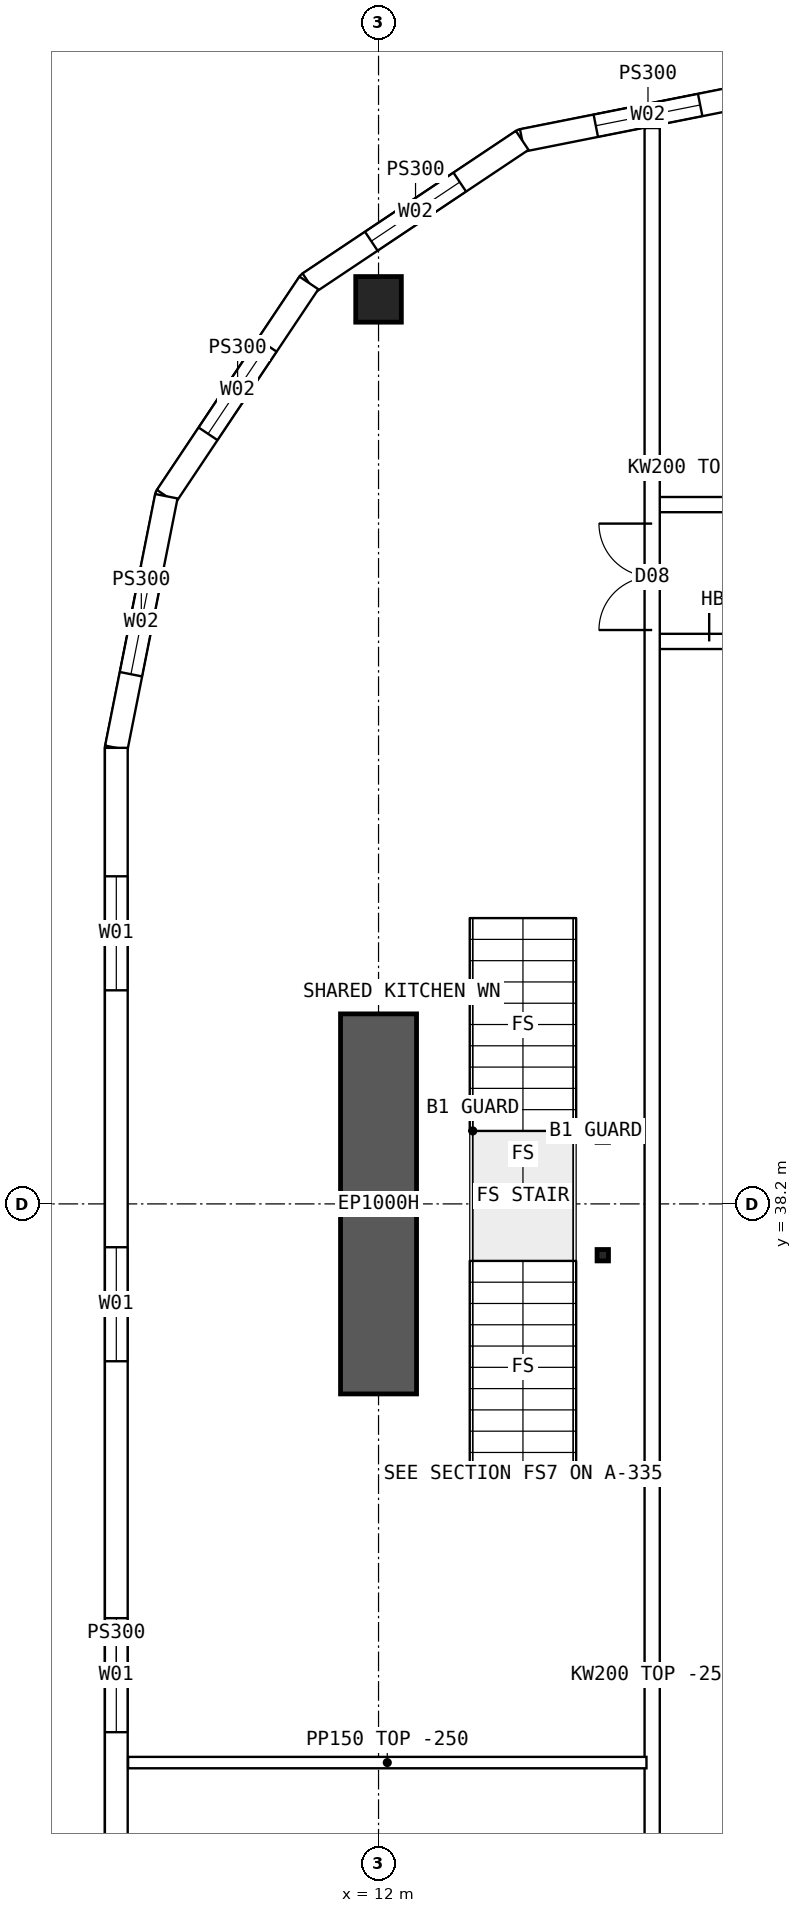
"""IFC4 building model, lengths in metres.
Left out: names, types, materials, properties, quantities, classifications, styles, units other than length and angle.
Written with IfcOpenShell. Run it as: python <this file> out.ifc"""

import sys

from ifc_helpers import new_model, si_unit, direction, frame, frame_2d, origin, origin_2d, place, context, subcontext, project, spatial, polyline, rectangle, hollow_rectangle, outline, extrude, element, fill, save


model = new_model("IFC4")
c1 = context("Model", 3, precision=1e-05, world=origin(), true_north=direction((0.0, 1.0)))
c2 = subcontext(c1, "Body", "Model", "MODEL_VIEW")
j1 = project(units=[si_unit("LENGTHUNIT", "METRE"), si_unit("PLANEANGLEUNIT", "RADIAN")], contexts=[c1])
p1 = place(None, origin())
s1 = spatial("IfcSite", under=j1, at=p1, CompositionType="ELEMENT")
p2 = place(p1, origin())
s2 = spatial("IfcBuilding", under=s1, at=p2, CompositionType="ELEMENT")
p3 = place(p2, frame((0.0, 0.0, 216.55)))
s3 = spatial("IfcBuildingStorey", under=s2, at=p3, CompositionType="ELEMENT", Elevation=216.55)
p4 = place(p3, frame((12.0, 50.1, 0.0), z_axis=(0.0, 0.0, 1.0), x_axis=(1.0, 0.0, 0.0)))
e1 = element("IfcColumn", 1, at=p4, inside=s3, PredefinedType="COLUMN", context=c2, shape_type="SweptSolid", body=[
    extrude(hollow_rectangle(XDim=0.6, YDim=0.6, WallThickness=0.06, at=origin_2d()), origin(), (0.0, 0.0, 1.0), 3.75),
])
p5 = place(p3, frame((12.0, 35.7, 0.0), z_axis=(0.0, 0.0, 1.0), x_axis=(0.0, 1.0, 0.0)))
e2 = element("IfcWall", 2, at=p5, inside=s3, PredefinedType="SHEAR", context=c2, shape_type="SweptSolid", body=[
    extrude(rectangle(XDim=5.0, YDim=1.0, at=frame_2d((2.5, 0.0))), origin(), (0.0, 0.0, 1.0), 3.75),
])
p6 = place(p3, frame((8.55, 44.2, 0.0), z_axis=(0.0, 0.0, 1.0), x_axis=(0.0, -1.0, 0.0)))
e3 = element("IfcWall", 3, at=p6, inside=s3, PredefinedType="SOLIDWALL", context=c2, shape_type="SweptSolid", body=[
    extrude(outline(polyline([(-0.015, -0.15), (24.415, -0.15), (24.385, 0.15), (0.015, 0.15), (-0.015, -0.15)])), origin(), (0.0, 0.0, 1.0), 3.5),
])
p7 = place(p6, frame((1.69, 0.0, 0.9)))
e4 = element("IfcOpeningElement", 4, at=p7, cuts=e3, PredefinedType="OPENING", context=c2, shape_type="SweptSolid", body=[
    extrude(rectangle(XDim=1.5, YDim=2.0, at=frame_2d((0.75, 1.0))), frame((0.0, 0.16, 0.0), z_axis=(0.0, -1.0, 0.0), x_axis=(1.0, 0.0, 0.0)), (0.0, 0.0, 1.0), 0.32),
])
p8 = place(p6, frame((6.57, 0.0, 0.9)))
e5 = element("IfcOpeningElement", 5, at=p8, cuts=e3, PredefinedType="OPENING", context=c2, shape_type="SweptSolid", body=[
    extrude(rectangle(XDim=1.5, YDim=2.0, at=frame_2d((0.75, 1.0))), frame((0.0, 0.16, 0.0), z_axis=(0.0, -1.0, 0.0), x_axis=(1.0, 0.0, 0.0)), (0.0, 0.0, 1.0), 0.32),
])
p9 = place(p6, frame((11.45, 0.0, 0.9)))
e6 = element("IfcOpeningElement", 6, at=p9, cuts=e3, PredefinedType="OPENING", context=c2, shape_type="SweptSolid", body=[
    extrude(rectangle(XDim=1.5, YDim=2.0, at=frame_2d((0.75, 1.0))), frame((0.0, 0.16, 0.0), z_axis=(0.0, -1.0, 0.0), x_axis=(1.0, 0.0, 0.0)), (0.0, 0.0, 1.0), 0.32),
])
p10 = place(p6, frame((16.33, 0.0, 0.9)))
e7 = element("IfcOpeningElement", 7, at=p10, cuts=e3, PredefinedType="OPENING", context=c2, shape_type="SweptSolid", body=[
    extrude(rectangle(XDim=1.5, YDim=2.0, at=frame_2d((0.75, 1.0))), frame((0.0, 0.16, 0.0), z_axis=(0.0, -1.0, 0.0), x_axis=(1.0, 0.0, 0.0)), (0.0, 0.0, 1.0), 0.32),
])
p11 = place(p6, frame((21.21, 0.0, 0.9)))
e8 = element("IfcOpeningElement", 8, at=p11, cuts=e3, PredefinedType="OPENING", context=c2, shape_type="SweptSolid", body=[
    extrude(rectangle(XDim=1.5, YDim=2.0, at=frame_2d((0.75, 1.0))), frame((0.0, 0.16, 0.0), z_axis=(0.0, -1.0, 0.0), x_axis=(1.0, 0.0, 0.0)), (0.0, 0.0, 1.0), 0.32),
])
p12 = place(p3, frame((17.2, 52.85, 0.0), z_axis=(0.0, 0.0, 1.0), x_axis=(-0.98078325777, -0.195100490205, 0.0)))
e9 = element("IfcWall", 9, at=p12, inside=s3, PredefinedType="SOLIDWALL", context=c2, shape_type="SweptSolid", body=[
    extrude(outline(polyline([(-0.03, -0.15), (3.405, -0.15), (3.345, 0.15), (0.03, 0.15), (-0.03, -0.15)])), origin(), (0.0, 0.0, 1.0), 3.5),
])
p13 = place(p12, frame((0.988, 0.0, 0.9)))
e10 = element("IfcOpeningElement", 10, at=p13, cuts=e9, PredefinedType="OPENING", context=c2, shape_type="SweptSolid", body=[
    extrude(rectangle(XDim=1.4, YDim=1.8, at=frame_2d((0.7, 0.9))), frame((0.0, 0.16, 0.0), z_axis=(0.0, -1.0, 0.0), x_axis=(1.0, 0.0, 0.0)), (0.0, 0.0, 1.0), 0.32),
])
p14 = place(p3, frame((13.89, 52.192, 0.0), z_axis=(0.0, 0.0, 1.0), x_axis=(-0.831460037396, -0.555584562613, 0.0)))
e11 = element("IfcWall", 11, at=p14, inside=s3, PredefinedType="SOLIDWALL", context=c2, shape_type="SweptSolid", body=[
    extrude(outline(polyline([(-0.03, -0.15), (3.405, -0.15), (3.345, 0.15), (0.03, 0.15), (-0.03, -0.15)])), origin(), (0.0, 0.0, 1.0), 3.5),
])
p15 = place(p14, frame((0.988, 0.0, 0.9)))
e12 = element("IfcOpeningElement", 12, at=p15, cuts=e11, PredefinedType="OPENING", context=c2, shape_type="SweptSolid", body=[
    extrude(rectangle(XDim=1.4, YDim=1.8, at=frame_2d((0.7, 0.9))), frame((0.0, 0.16, 0.0), z_axis=(0.0, -1.0, 0.0), x_axis=(1.0, 0.0, 0.0)), (0.0, 0.0, 1.0), 0.32),
])
p16 = place(p3, frame((11.083, 50.316, 0.0), z_axis=(0.0, 0.0, 1.0), x_axis=(-0.555567969291, -0.831471124873, 0.0)))
e13 = element("IfcWall", 13, at=p16, inside=s3, PredefinedType="SOLIDWALL", context=c2, shape_type="SweptSolid", body=[
    extrude(outline(polyline([(-0.03, -0.15), (3.405, -0.15), (3.345, 0.15), (0.03, 0.15), (-0.03, -0.15)])), origin(), (0.0, 0.0, 1.0), 3.5),
])
p17 = place(p16, frame((0.988, 0.0, 0.9)))
e14 = element("IfcOpeningElement", 14, at=p17, cuts=e13, PredefinedType="OPENING", context=c2, shape_type="SweptSolid", body=[
    extrude(rectangle(XDim=1.4, YDim=1.8, at=frame_2d((0.7, 0.9))), frame((0.0, 0.16, 0.0), z_axis=(0.0, -1.0, 0.0), x_axis=(1.0, 0.0, 0.0)), (0.0, 0.0, 1.0), 0.32),
])
p18 = place(p3, frame((9.208, 47.51, 0.0), z_axis=(0.0, 0.0, 1.0), x_axis=(-0.19508664885, -0.980786011034, 0.0)))
e15 = element("IfcWall", 15, at=p18, inside=s3, PredefinedType="SOLIDWALL", context=c2, shape_type="SweptSolid", body=[
    extrude(outline(polyline([(-0.03, -0.15), (3.39, -0.15), (3.36, 0.15), (0.03, 0.15), (-0.03, -0.15)])), origin(), (0.0, 0.0, 1.0), 3.5),
])
p19 = place(p18, frame((0.988, 0.0, 0.9)))
e16 = element("IfcOpeningElement", 16, at=p19, cuts=e15, PredefinedType="OPENING", context=c2, shape_type="SweptSolid", body=[
    extrude(rectangle(XDim=1.4, YDim=1.8, at=frame_2d((0.7, 0.9))), frame((0.0, 0.16, 0.0), z_axis=(0.0, -1.0, 0.0), x_axis=(1.0, 0.0, 0.0)), (0.0, 0.0, 1.0), 0.32),
])
p20 = place(p3, frame((15.6, 47.4, 0.0), z_axis=(0.0, 0.0, 1.0), x_axis=(1.0, 0.0, 0.0)))
e17 = element("IfcWall", 17, at=p20, inside=s3, PredefinedType="SOLIDWALL", context=c2, shape_type="SweptSolid", body=[
    extrude(rectangle(XDim=2.05, YDim=0.2, at=frame_2d((1.025, 0.0))), origin(), (0.0, 0.0, 1.0), 3.5),
])
p21 = place(p20, frame((0.95, 0.0, 0.0)))
e18 = element("IfcOpeningElement", 18, at=p21, cuts=e17, PredefinedType="OPENING", context=c2, shape_type="SweptSolid", body=[
    extrude(rectangle(XDim=0.9, YDim=2.1, at=frame_2d((0.45, 1.05))), frame((0.0, 0.11, 0.0), z_axis=(0.0, -1.0, 0.0), x_axis=(1.0, 0.0, 0.0)), (0.0, 0.0, 1.0), 0.22),
])
p22 = place(p3, frame((15.6, 45.6, 0.0), z_axis=(0.0, 0.0, 1.0), x_axis=(1.0, 0.0, 0.0)))
e19 = element("IfcWall", 19, at=p22, inside=s3, PredefinedType="SOLIDWALL", context=c2, shape_type="SweptSolid", body=[
    extrude(rectangle(XDim=2.05, YDim=0.2, at=frame_2d((1.025, 0.0))), origin(), (0.0, 0.0, 1.0), 3.5),
])
p23 = place(p22, frame((0.75, 0.0, 0.0)))
e20 = element("IfcOpeningElement", 20, at=p23, cuts=e19, PredefinedType="OPENING", context=c2, shape_type="SweptSolid", body=[
    extrude(rectangle(XDim=1.2, YDim=2.1, at=frame_2d((0.6, 1.05))), frame((0.0, 0.11, 0.0), z_axis=(0.0, -1.0, 0.0), x_axis=(1.0, 0.0, 0.0)), (0.0, 0.0, 1.0), 0.22),
])
p24 = place(p3, frame((8.705, 30.85, 0.0), z_axis=(0.0, 0.0, 1.0), x_axis=(1.0, 0.0, 0.0)))
e21 = element("IfcWall", 21, at=p24, inside=s3, PredefinedType="PARTITIONING", context=c2, shape_type="SweptSolid", body=[
    extrude(outline(polyline([(0.0, 0.0), (6.82, 0.0), (6.82, 3.5), (3.597, 3.5), (3.595, 3.05), (2.997, 3.05), (2.995, 3.5), (0.0, 3.5), (0.0, 0.0)])), frame((0.0, 0.075, 0.0), z_axis=(0.0, -1.0, 0.0), x_axis=(1.0, 0.0, 0.0)), (0.0, 0.0, 1.0), 0.15),
])
p25 = place(p3, frame((15.6, 11.646, 0.0), z_axis=(0.0, 0.0, 1.0), x_axis=(0.0, 1.0, 0.0)))
e22 = element("IfcWall", 22, at=p25, inside=s3, PredefinedType="SOLIDWALL", context=c2, shape_type="SweptSolid", body=[
    extrude(rectangle(XDim=40.708, YDim=0.2, at=frame_2d((20.354, 0.0))), origin(), (0.0, 0.0, 1.0), 3.5),
])
p26 = place(p25, frame((13.434, 0.0, 0.0)))
e23 = element("IfcOpeningElement", 23, at=p26, cuts=e22, PredefinedType="OPENING", context=c2, shape_type="SweptSolid", body=[
    extrude(rectangle(XDim=1.2, YDim=2.1, at=frame_2d((0.6, 1.05))), frame((0.0, 0.11, 0.0), z_axis=(0.0, -1.0, 0.0), x_axis=(1.0, 0.0, 0.0)), (0.0, 0.0, 1.0), 0.22),
])
p27 = place(p25, frame((5.104, 0.0, 0.0)))
e24 = element("IfcOpeningElement", 24, at=p27, cuts=e22, PredefinedType="OPENING", context=c2, shape_type="SweptSolid", body=[
    extrude(rectangle(XDim=1.4, YDim=2.1, at=frame_2d((0.7, 1.05))), frame((0.0, 0.11, 0.0), z_axis=(0.0, -1.0, 0.0), x_axis=(1.0, 0.0, 0.0)), (0.0, 0.0, 1.0), 0.22),
])
p28 = place(p25, frame((34.104, 0.0, 0.0)))
e25 = element("IfcOpeningElement", 25, at=p28, cuts=e22, PredefinedType="OPENING", context=c2, shape_type="SweptSolid", body=[
    extrude(rectangle(XDim=1.4, YDim=2.1, at=frame_2d((0.7, 1.05))), frame((0.0, 0.11, 0.0), z_axis=(0.0, -1.0, 0.0), x_axis=(1.0, 0.0, 0.0)), (0.0, 0.0, 1.0), 0.22),
])
for number, where, z_axis, x_axis in (
    (26, (14.95, 37.525, 0.0), (0.0, 0.0, 1.0), (1.0, 0.0, 0.0)),
    (27, (14.95, 39.085, 0.0), (0.0, 0.0, 1.0), (1.0, 0.0, 0.0)),
):
    element("IfcColumn", number, at=place(p3, frame(where, z_axis=z_axis, x_axis=x_axis)), inside=s3, PredefinedType="COLUMN", context=c2, shape_type="SweptSolid", body=[
        extrude(hollow_rectangle(XDim=0.15, YDim=0.15, WallThickness=0.008, at=origin_2d()), origin(), (0.0, 0.0, 1.0), 3.5),
    ])
p29 = place(p7, origin())
e28 = element("IfcWindow", 28, at=p29, inside=s3, PartitioningType="SINGLE_PANEL", PredefinedType="WINDOW", context=c2, shape_type="SweptSolid", body=[
    extrude(rectangle(XDim=1.5, YDim=2.0, at=frame_2d((0.75, 1.0))), frame((0.0, 0.03, 0.0), z_axis=(0.0, -1.0, 0.0), x_axis=(1.0, 0.0, 0.0)), (0.0, 0.0, 1.0), 0.06),
])
fill(e4, e28)
p30 = place(p8, origin())
e29 = element("IfcWindow", 29, at=p30, inside=s3, PartitioningType="SINGLE_PANEL", PredefinedType="WINDOW", context=c2, shape_type="SweptSolid", body=[
    extrude(rectangle(XDim=1.5, YDim=2.0, at=frame_2d((0.75, 1.0))), frame((0.0, 0.03, 0.0), z_axis=(0.0, -1.0, 0.0), x_axis=(1.0, 0.0, 0.0)), (0.0, 0.0, 1.0), 0.06),
])
fill(e5, e29)
p31 = place(p9, origin())
e30 = element("IfcWindow", 30, at=p31, inside=s3, PartitioningType="SINGLE_PANEL", PredefinedType="WINDOW", context=c2, shape_type="SweptSolid", body=[
    extrude(rectangle(XDim=1.5, YDim=2.0, at=frame_2d((0.75, 1.0))), frame((0.0, 0.03, 0.0), z_axis=(0.0, -1.0, 0.0), x_axis=(1.0, 0.0, 0.0)), (0.0, 0.0, 1.0), 0.06),
])
fill(e6, e30)
p32 = place(p13, origin())
e31 = element("IfcWindow", 31, at=p32, inside=s3, PartitioningType="SINGLE_PANEL", PredefinedType="WINDOW", context=c2, shape_type="SweptSolid", body=[
    extrude(rectangle(XDim=1.4, YDim=1.8, at=frame_2d((0.7, 0.9))), frame((0.0, 0.03, 0.0), z_axis=(0.0, -1.0, 0.0), x_axis=(1.0, 0.0, 0.0)), (0.0, 0.0, 1.0), 0.06),
])
fill(e10, e31)
p33 = place(p15, origin())
e32 = element("IfcWindow", 32, at=p33, inside=s3, PartitioningType="SINGLE_PANEL", PredefinedType="WINDOW", context=c2, shape_type="SweptSolid", body=[
    extrude(rectangle(XDim=1.4, YDim=1.8, at=frame_2d((0.7, 0.9))), frame((0.0, 0.03, 0.0), z_axis=(0.0, -1.0, 0.0), x_axis=(1.0, 0.0, 0.0)), (0.0, 0.0, 1.0), 0.06),
])
fill(e12, e32)
p34 = place(p17, origin())
e33 = element("IfcWindow", 33, at=p34, inside=s3, PartitioningType="SINGLE_PANEL", PredefinedType="WINDOW", context=c2, shape_type="SweptSolid", body=[
    extrude(rectangle(XDim=1.4, YDim=1.8, at=frame_2d((0.7, 0.9))), frame((0.0, 0.03, 0.0), z_axis=(0.0, -1.0, 0.0), x_axis=(1.0, 0.0, 0.0)), (0.0, 0.0, 1.0), 0.06),
])
fill(e14, e33)
p35 = place(p19, origin())
e34 = element("IfcWindow", 34, at=p35, inside=s3, PartitioningType="SINGLE_PANEL", PredefinedType="WINDOW", context=c2, shape_type="SweptSolid", body=[
    extrude(rectangle(XDim=1.4, YDim=1.8, at=frame_2d((0.7, 0.9))), frame((0.0, 0.03, 0.0), z_axis=(0.0, -1.0, 0.0), x_axis=(1.0, 0.0, 0.0)), (0.0, 0.0, 1.0), 0.06),
])
fill(e16, e34)
p36 = place(p23, origin())
e35 = element("IfcDoor", 35, at=p36, inside=s3, OperationType="DOUBLE_DOOR_SINGLE_SWING", PredefinedType="DOOR", context=c2, shape_type="SweptSolid", body=[
    extrude(rectangle(XDim=1.2, YDim=2.1, at=frame_2d((0.6, 1.05))), frame((0.0, 0.025, 0.0), z_axis=(0.0, -1.0, 0.0), x_axis=(1.0, 0.0, 0.0)), (0.0, 0.0, 1.0), 0.05),
])
fill(e20, e35)
p37 = place(p28, origin())
e36 = element("IfcDoor", 36, at=p37, inside=s3, OperationType="DOUBLE_DOOR_SINGLE_SWING", PredefinedType="DOOR", context=c2, shape_type="SweptSolid", body=[
    extrude(rectangle(XDim=1.4, YDim=2.1, at=frame_2d((0.7, 1.05))), frame((0.0, 0.025, 0.0), z_axis=(0.0, -1.0, 0.0), x_axis=(1.0, 0.0, 0.0)), (0.0, 0.0, 1.0), 0.05),
])
fill(e25, e36)
save(model, sys.argv[1])
